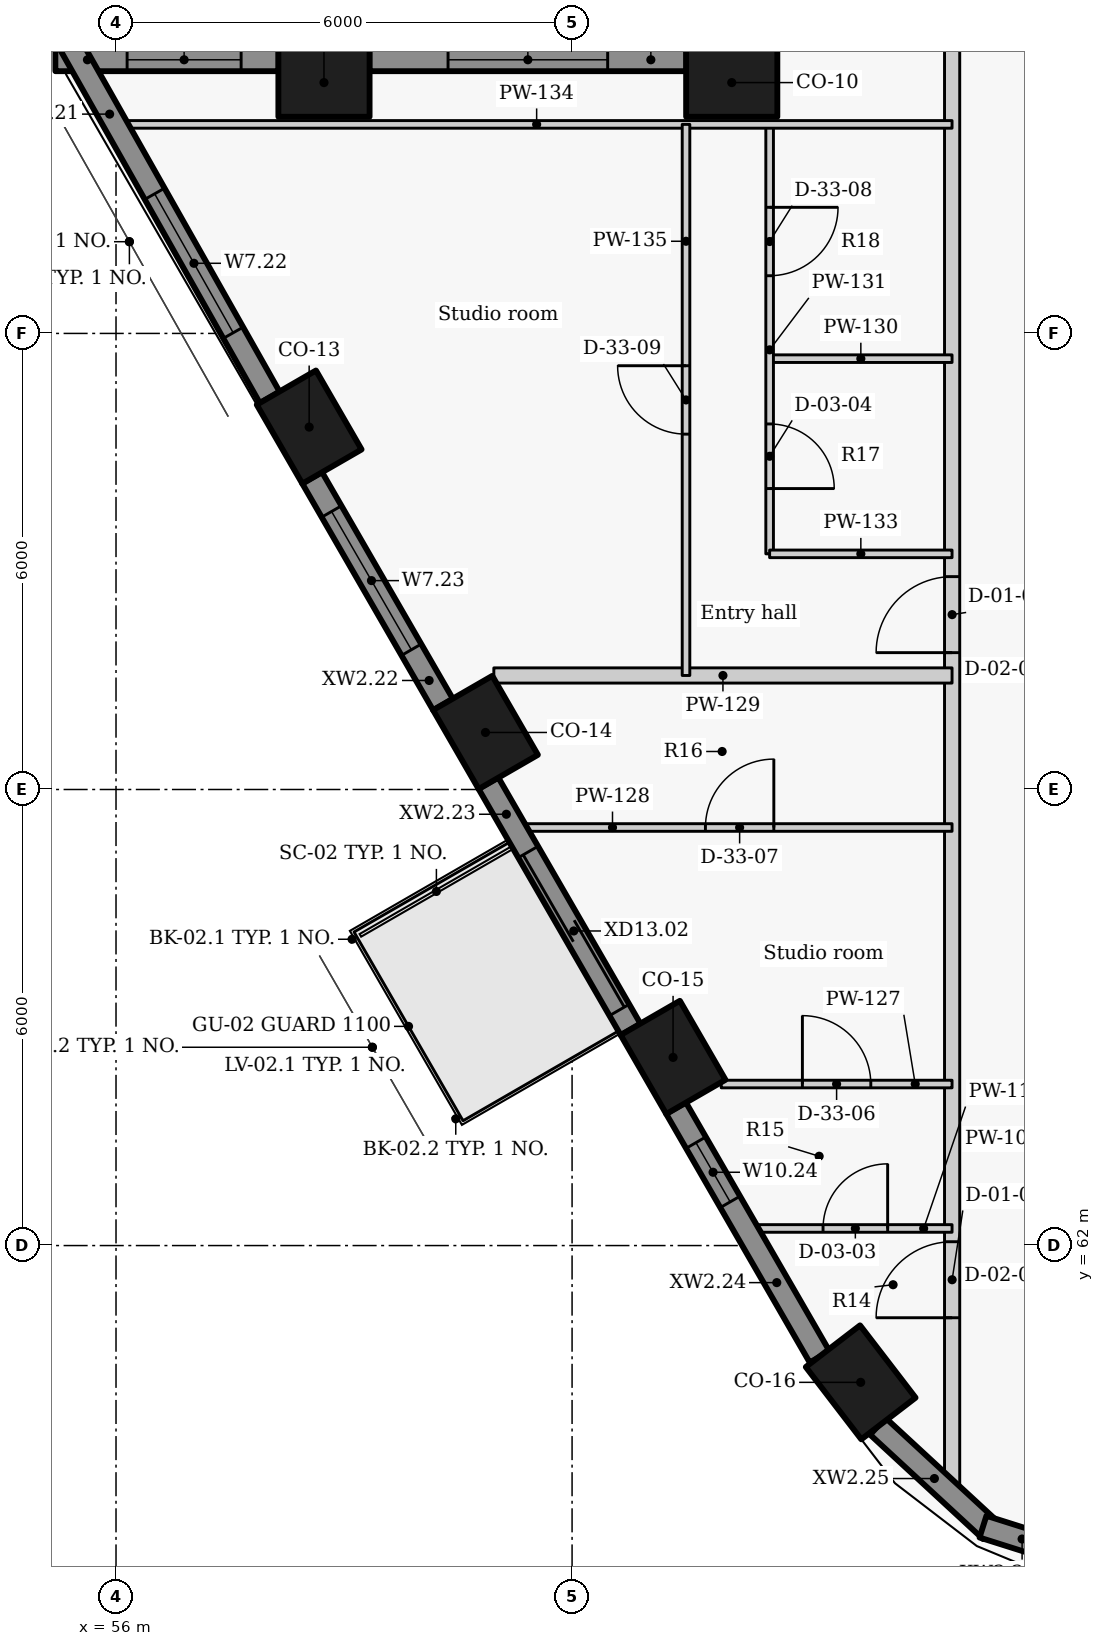
"""IFC4 building model, lengths in metres.
Left out: names, types, materials, properties, quantities, classifications, styles, units other than length and angle.
Written with IfcOpenShell. Run it as: python <this file> out.ifc"""

import sys

from ifc_helpers import new_model, si_unit, direction, frame, frame_2d, origin, origin_2d, place, context, subcontext, project, spatial, rectangle, extrude, element, fill, save


model = new_model("IFC4")
c1 = context("Model", 3, precision=1e-05, world=origin(), true_north=direction((0.0, 1.0)))
c2 = subcontext(c1, "Body", "Model", "MODEL_VIEW")
j1 = project(units=[si_unit("LENGTHUNIT", "METRE"), si_unit("PLANEANGLEUNIT", "RADIAN")], contexts=[c1])
p1 = place(None, origin())
s1 = spatial("IfcSite", under=j1, at=p1, CompositionType="ELEMENT")
p2 = place(p1, origin())
s2 = spatial("IfcBuilding", under=s1, at=p2, CompositionType="ELEMENT")
p3 = place(p2, frame((0.0, 0.0, 203.1)))
s3 = spatial("IfcBuildingStorey", under=s2, at=p3, CompositionType="ELEMENT", Elevation=203.1)
for number, where, z_axis, x_axis in (
    (1, (64.101, 77.3, 0.0), (0.0, 0.0, 1.0), (-1.0, 0.0, 0.0)),
    (2, (58.736, 77.3, 0.0), (0.0, 0.0, 1.0), (-1.0, 0.0, 0.0)),
    (3, (58.541, 72.768, 0.0), (0.0, 0.0, 1.0), (0.5, -0.866, 0.0)),
    (4, (60.861, 68.75, 0.0), (0.0, 0.0, 1.0), (0.5, -0.866, 0.0)),
    (5, (63.329, 64.475, 0.0), (0.0, 0.0, 1.0), (0.5, -0.866, 0.0)),
    (6, (65.797, 60.2, 0.0), (0.0, 0.0, 1.0), (0.609, -0.793, 0.0)),
):
    element("IfcColumn", number, at=place(p3, frame(where, z_axis=z_axis, x_axis=x_axis)), inside=s3, PredefinedType="COLUMN", context=c2, shape_type="SweptSolid", body=[
        extrude(rectangle(XDim=1.2, YDim=0.9, at=origin_2d()), origin(), (0.0, 0.0, 1.0), 3.3),
    ])
p4 = place(p3, frame((63.504, 77.6, 0.0), z_axis=(0.0, 0.0, 1.0), x_axis=(-1.0, 0.0, 0.0)))
e7 = element("IfcWall", 7, at=p4, inside=s3, PredefinedType="SOLIDWALL", context=c2, shape_type="SweptSolid", body=[
    extrude(rectangle(XDim=4.172, YDim=0.3, at=frame_2d((2.086, 0.0))), origin(), (0.0, 0.0, 1.0), 2.425),
])
p5 = place(p4, frame((1.036, 0.0, 0.9)))
e8 = element("IfcOpeningElement", 8, at=p5, cuts=e7, PredefinedType="OPENING", context=c2, shape_type="SweptSolid", body=[
    extrude(rectangle(XDim=2.1, YDim=1.1, at=frame_2d((1.05, 0.55))), frame((0.0, 0.16, 0.0), z_axis=(0.0, -1.0, 0.0), x_axis=(1.0, 0.0, 0.0)), (0.0, 0.0, 1.0), 0.32),
])
p6 = place(p3, frame((58.14, 77.6, 0.0), z_axis=(0.0, 0.0, 1.0), x_axis=(-1.0, 0.0, 0.0)))
e9 = element("IfcWall", 9, at=p6, inside=s3, PredefinedType="SOLIDWALL", context=c2, shape_type="SweptSolid", body=[
    extrude(rectangle(XDim=2.938, YDim=0.3, at=frame_2d((1.469, 0.0))), origin(), (0.0, 0.0, 1.0), 2.425),
])
p7 = place(p6, frame((0.494, 0.0, 0.9)))
e10 = element("IfcOpeningElement", 10, at=p7, cuts=e9, PredefinedType="OPENING", context=c2, shape_type="SweptSolid", body=[
    extrude(rectangle(XDim=1.5, YDim=1.1, at=frame_2d((0.75, 0.55))), frame((0.0, 0.16, 0.0), z_axis=(0.0, -1.0, 0.0), x_axis=(1.0, 0.0, 0.0)), (0.0, 0.0, 1.0), 0.32),
])
p8 = place(p3, frame((55.373, 77.846, 0.0), z_axis=(0.0, 0.0, 1.0), x_axis=(0.492033360928, -0.870576344575, 0.0)))
e11 = element("IfcWall", 11, at=p8, inside=s3, PredefinedType="SOLIDWALL", context=c2, shape_type="SweptSolid", body=[
    extrude(rectangle(XDim=5.387, YDim=0.3, at=frame_2d((2.693, 0.0))), origin(), (0.0, 0.0, 1.0), 2.425),
])
p9 = place(p8, frame((2.308, 0.0, 0.9)))
e12 = element("IfcOpeningElement", 12, at=p9, cuts=e11, PredefinedType="OPENING", context=c2, shape_type="SweptSolid", body=[
    extrude(rectangle(XDim=2.1, YDim=1.1, at=frame_2d((1.05, 0.55))), frame((0.0, 0.16, 0.0), z_axis=(0.0, -1.0, 0.0), x_axis=(1.0, 0.0, 0.0)), (0.0, 0.0, 1.0), 0.32),
])
p10 = place(p3, frame((58.579, 72.102, 0.0), z_axis=(0.0, 0.0, 1.0), x_axis=(0.499955427682, -0.866051136095, 0.0)))
e13 = element("IfcWall", 13, at=p10, inside=s3, PredefinedType="SOLIDWALL", context=c2, shape_type="SweptSolid", body=[
    extrude(rectangle(XDim=3.447, YDim=0.3, at=frame_2d((1.724, 0.0))), origin(), (0.0, 0.0, 1.0), 2.425),
])
p11 = place(p10, frame((0.513, 0.0, 0.9)))
e14 = element("IfcOpeningElement", 14, at=p11, cuts=e13, PredefinedType="OPENING", context=c2, shape_type="SweptSolid", body=[
    extrude(rectangle(XDim=2.1, YDim=1.1, at=frame_2d((1.05, 0.55))), frame((0.0, 0.16, 0.0), z_axis=(0.0, -1.0, 0.0), x_axis=(1.0, 0.0, 0.0)), (0.0, 0.0, 1.0), 0.32),
])
p12 = place(p3, frame((60.899, 68.084, 0.0), z_axis=(0.0, 0.0, 1.0), x_axis=(0.500059225181, -0.86599120741, 0.0)))
e15 = element("IfcWall", 15, at=p12, inside=s3, PredefinedType="SOLIDWALL", context=c2, shape_type="SweptSolid", body=[
    extrude(rectangle(XDim=3.744, YDim=0.3, at=frame_2d((1.872, 0.0))), origin(), (0.0, 0.0, 1.0), 2.425),
])
p13 = place(p12, frame((1.046, 0.0, 0.0)))
e16 = element("IfcOpeningElement", 16, at=p13, cuts=e15, PredefinedType="OPENING", context=c2, shape_type="SweptSolid", body=[
    extrude(rectangle(XDim=2.4, YDim=2.0, at=frame_2d((1.2, 1.0))), frame((0.0, 0.16, 0.0), z_axis=(0.0, -1.0, 0.0), x_axis=(1.0, 0.0, 0.0)), (0.0, 0.0, 1.0), 0.32),
])
p14 = place(p3, frame((63.367, 63.809, 0.0), z_axis=(0.0, 0.0, 1.0), x_axis=(0.499961087031, -0.866047869032, 0.0)))
e17 = element("IfcWall", 17, at=p14, inside=s3, PredefinedType="SOLIDWALL", context=c2, shape_type="SweptSolid", body=[
    extrude(rectangle(XDim=3.779, YDim=0.3, at=frame_2d((1.889, 0.0))), origin(), (0.0, 0.0, 1.0), 2.425),
])
p15 = place(p14, frame((0.526, 0.0, 1.5)))
e18 = element("IfcOpeningElement", 18, at=p15, cuts=e17, PredefinedType="OPENING", context=c2, shape_type="SweptSolid", body=[
    extrude(rectangle(XDim=0.9, YDim=0.5, at=frame_2d((0.45, 0.25))), frame((0.0, 0.16, 0.0), z_axis=(0.0, -1.0, 0.0), x_axis=(1.0, 0.0, 0.0)), (0.0, 0.0, 1.0), 0.32),
])
p16 = place(p3, frame((66.022, 59.622, 0.0), z_axis=(0.0, 0.0, 1.0), x_axis=(0.734627852992, -0.678470277616, 0.0)))
e19 = element("IfcWall", 19, at=p16, inside=s3, PredefinedType="SOLIDWALL", context=c2, shape_type="SweptSolid", body=[
    extrude(rectangle(XDim=2.026, YDim=0.3, at=frame_2d((1.013, 0.0))), origin(), (0.0, 0.0, 1.0), 2.425),
])
p17 = place(p3, frame((67.406, 58.302, 0.0), z_axis=(0.0, 0.0, 1.0), x_axis=(0.953537608367, -0.301274010545, 0.0)))
e20 = element("IfcWall", 20, at=p17, inside=s3, PredefinedType="SOLIDWALL", context=c2, shape_type="SweptSolid", body=[
    extrude(rectangle(XDim=2.048, YDim=0.3, at=frame_2d((1.024, 0.0))), origin(), (0.0, 0.0, 1.0), 2.425),
])
p18 = place(p17, frame((1.18, 0.0, 0.9)))
e21 = element("IfcOpeningElement", 21, at=p18, cuts=e20, PredefinedType="OPENING", context=c2, shape_type="SweptSolid", body=[
    extrude(rectangle(XDim=0.6, YDim=1.1, at=frame_2d((0.3, 0.55))), frame((0.0, 0.16, 0.0), z_axis=(0.0, -1.0, 0.0), x_axis=(1.0, 0.0, 0.0)), (0.0, 0.0, 1.0), 0.32),
])
p19 = place(p3, frame((67.0, 58.674, 0.0), z_axis=(0.0, 0.0, 1.0), x_axis=(0.0, 1.0, 0.0)))
e22 = element("IfcWall", 22, at=p19, inside=s3, PredefinedType="PARTITIONING", context=c2, shape_type="SweptSolid", body=[
    extrude(rectangle(XDim=42.592, YDim=0.2, at=frame_2d((21.296, 0.0))), origin(), (0.0, 0.0, 1.0), 2.405),
])
p20 = place(p19, frame((2.376, 0.0, 0.0)))
e23 = element("IfcOpeningElement", 23, at=p20, cuts=e22, PredefinedType="OPENING", context=c2, shape_type="SweptSolid", body=[
    extrude(rectangle(XDim=1.0, YDim=2.1, at=frame_2d((0.5, 1.05))), frame((0.0, 0.11, 0.0), z_axis=(0.0, -1.0, 0.0), x_axis=(1.0, 0.0, 0.0)), (0.0, 0.0, 1.0), 0.22),
])
p21 = place(p19, frame((11.126, 0.0, 0.0)))
e24 = element("IfcOpeningElement", 24, at=p21, cuts=e22, PredefinedType="OPENING", context=c2, shape_type="SweptSolid", body=[
    extrude(rectangle(XDim=1.0, YDim=2.1, at=frame_2d((0.5, 1.05))), frame((0.0, 0.11, 0.0), z_axis=(0.0, -1.0, 0.0), x_axis=(1.0, 0.0, 0.0)), (0.0, 0.0, 1.0), 0.22),
])
p22 = place(p19, frame((25.626, 0.0, 0.0)))
e25 = element("IfcOpeningElement", 25, at=p22, cuts=e22, PredefinedType="OPENING", context=c2, shape_type="SweptSolid", body=[
    extrude(rectangle(XDim=1.0, YDim=2.1, at=frame_2d((0.5, 1.05))), frame((0.0, 0.11, 0.0), z_axis=(0.0, -1.0, 0.0), x_axis=(1.0, 0.0, 0.0)), (0.0, 0.0, 1.0), 0.22),
])
p23 = place(p19, frame((21.2, 0.0, 0.0)))
e26 = element("IfcOpeningElement", 26, at=p23, cuts=e22, PredefinedType="OPENING", context=c2, shape_type="SweptSolid", body=[
    extrude(rectangle(XDim=1.0, YDim=2.1, at=frame_2d((0.5, 1.05))), frame((0.0, 0.11, 0.0), z_axis=(0.0, -1.0, 0.0), x_axis=(1.0, 0.0, 0.0)), (0.0, 0.0, 1.0), 0.22),
])
p24 = place(p19, frame((37.788, 0.0, 0.0)))
e27 = element("IfcOpeningElement", 27, at=p24, cuts=e22, PredefinedType="OPENING", context=c2, shape_type="SweptSolid", body=[
    extrude(rectangle(XDim=1.0, YDim=2.1, at=frame_2d((0.5, 1.05))), frame((0.0, 0.11, 0.0), z_axis=(0.0, -1.0, 0.0), x_axis=(1.0, 0.0, 0.0)), (0.0, 0.0, 1.0), 0.22),
])
p25 = place(p3, frame((64.455, 62.225, 0.0), z_axis=(0.0, 0.0, 1.0), x_axis=(1.0, 0.0, 0.0)))
e28 = element("IfcWall", 28, at=p25, inside=s3, PredefinedType="PARTITIONING", context=c2, shape_type="SweptSolid", body=[
    extrude(rectangle(XDim=2.544, YDim=0.1, at=frame_2d((1.272, 0.0))), origin(), (0.0, 0.0, 1.0), 2.405),
])
p26 = place(p25, frame((0.847, 0.0, 0.0)))
e29 = element("IfcOpeningElement", 29, at=p26, cuts=e28, PredefinedType="OPENING", context=c2, shape_type="SweptSolid", body=[
    extrude(rectangle(XDim=0.85, YDim=2.1, at=frame_2d((0.425, 1.05))), frame((0.0, 0.06, 0.0), z_axis=(0.0, -1.0, 0.0), x_axis=(1.0, 0.0, 0.0)), (0.0, 0.0, 1.0), 0.12),
])
p27 = place(p3, frame((63.962, 64.125, 0.0), z_axis=(0.0, 0.0, 1.0), x_axis=(1.0, 0.0, 0.0)))
e30 = element("IfcWall", 30, at=p27, inside=s3, PredefinedType="PARTITIONING", context=c2, shape_type="SweptSolid", body=[
    extrude(rectangle(XDim=3.037, YDim=0.1, at=frame_2d((1.519, 0.0))), origin(), (0.0, 0.0, 1.0), 3.025),
])
p28 = place(p27, frame((1.068, 0.0, 0.0)))
e31 = element("IfcOpeningElement", 31, at=p28, cuts=e30, PredefinedType="OPENING", context=c2, shape_type="SweptSolid", body=[
    extrude(rectangle(XDim=0.9, YDim=2.1, at=frame_2d((0.45, 1.05))), frame((0.0, 0.06, 0.0), z_axis=(0.0, -1.0, 0.0), x_axis=(1.0, 0.0, 0.0)), (0.0, 0.0, 1.0), 0.12),
])
p29 = place(p3, frame((61.409, 67.5, 0.0), z_axis=(0.0, 0.0, 1.0), x_axis=(1.0, 0.0, 0.0)))
e32 = element("IfcWall", 32, at=p29, inside=s3, PredefinedType="PARTITIONING", context=c2, shape_type="SweptSolid", body=[
    extrude(rectangle(XDim=5.59, YDim=0.1, at=frame_2d((2.795, 0.0))), origin(), (0.0, 0.0, 1.0), 2.405),
])
p30 = place(p29, frame((2.345, 0.0, 0.0)))
e33 = element("IfcOpeningElement", 33, at=p30, cuts=e32, PredefinedType="OPENING", context=c2, shape_type="SweptSolid", body=[
    extrude(rectangle(XDim=0.9, YDim=2.1, at=frame_2d((0.45, 1.05))), frame((0.0, 0.06, 0.0), z_axis=(0.0, -1.0, 0.0), x_axis=(1.0, 0.0, 0.0)), (0.0, 0.0, 1.0), 0.12),
])
p31 = place(p3, frame((60.971, 69.5, 0.0), z_axis=(0.0, 0.0, 1.0), x_axis=(1.0, 0.0, 0.0)))
e34 = element("IfcWall", 34, at=p31, inside=s3, PredefinedType="PARTITIONING", context=c2, shape_type="SweptSolid", body=[
    extrude(rectangle(XDim=6.028, YDim=0.2, at=frame_2d((3.014, 0.0))), origin(), (0.0, 0.0, 1.0), 3.025),
])
p32 = place(p3, frame((64.599, 73.668, 0.0), z_axis=(0.0, 0.0, 1.0), x_axis=(1.0, 0.0, 0.0)))
e35 = element("IfcWall", 35, at=p32, inside=s3, PredefinedType="PARTITIONING", context=c2, shape_type="SweptSolid", body=[
    extrude(rectangle(XDim=2.4, YDim=0.1, at=frame_2d((1.2, 0.0))), origin(), (0.0, 0.0, 1.0), 3.025),
])
p33 = place(p3, frame((64.599, 76.75, 0.0), z_axis=(0.0, 0.0, 1.0), x_axis=(0.0, -1.0, 0.0)))
e36 = element("IfcWall", 36, at=p33, inside=s3, PredefinedType="PARTITIONING", context=c2, shape_type="SweptSolid", body=[
    extrude(rectangle(XDim=5.65, YDim=0.1, at=frame_2d((2.825, 0.0))), origin(), (0.0, 0.0, 1.0), 3.025),
])
p34 = place(p33, frame((3.941, 0.0, 0.0)))
e37 = element("IfcOpeningElement", 37, at=p34, cuts=e36, PredefinedType="OPENING", context=c2, shape_type="SweptSolid", body=[
    extrude(rectangle(XDim=0.85, YDim=2.1, at=frame_2d((0.425, 1.05))), frame((0.0, 0.06, 0.0), z_axis=(0.0, -1.0, 0.0), x_axis=(1.0, 0.0, 0.0)), (0.0, 0.0, 1.0), 0.12),
])
p35 = place(p33, frame((1.091, 0.0, 0.0)))
e38 = element("IfcOpeningElement", 38, at=p35, cuts=e36, PredefinedType="OPENING", context=c2, shape_type="SweptSolid", body=[
    extrude(rectangle(XDim=0.9, YDim=2.1, at=frame_2d((0.45, 1.05))), frame((0.0, 0.06, 0.0), z_axis=(0.0, -1.0, 0.0), x_axis=(1.0, 0.0, 0.0)), (0.0, 0.0, 1.0), 0.12),
])
p36 = place(p3, frame((64.599, 71.1, 0.0), z_axis=(0.0, 0.0, 1.0), x_axis=(1.0, 0.0, 0.0)))
e39 = element("IfcWall", 39, at=p36, inside=s3, PredefinedType="PARTITIONING", context=c2, shape_type="SweptSolid", body=[
    extrude(rectangle(XDim=2.4, YDim=0.1, at=frame_2d((1.2, 0.0))), origin(), (0.0, 0.0, 1.0), 3.025),
])
p37 = place(p3, frame((56.069, 76.75, 0.0), z_axis=(0.0, 0.0, 1.0), x_axis=(1.0, 0.0, 0.0)))
e40 = element("IfcWall", 40, at=p37, inside=s3, PredefinedType="PARTITIONING", context=c2, shape_type="SweptSolid", body=[
    extrude(rectangle(XDim=10.93, YDim=0.1, at=frame_2d((5.465, 0.0))), origin(), (0.0, 0.0, 1.0), 2.405),
])
p38 = place(p3, frame((63.499, 69.5, 0.0), z_axis=(0.0, 0.0, 1.0), x_axis=(0.0, 1.0, 0.0)))
e41 = element("IfcWall", 41, at=p38, inside=s3, PredefinedType="PARTITIONING", context=c2, shape_type="SweptSolid", body=[
    extrude(rectangle(XDim=7.25, YDim=0.1, at=frame_2d((3.625, 0.0))), origin(), (0.0, 0.0, 1.0), 3.025),
])
p39 = place(p38, frame((3.175, 0.0, 0.0)))
e42 = element("IfcOpeningElement", 42, at=p39, cuts=e41, PredefinedType="OPENING", context=c2, shape_type="SweptSolid", body=[
    extrude(rectangle(XDim=0.9, YDim=2.1, at=frame_2d((0.45, 1.05))), frame((0.0, 0.06, 0.0), z_axis=(0.0, -1.0, 0.0), x_axis=(1.0, 0.0, 0.0)), (0.0, 0.0, 1.0), 0.12),
])
p40 = place(p5, origin())
e43 = element("IfcWindow", 43, at=p40, inside=s3, PartitioningType="SINGLE_PANEL", PredefinedType="WINDOW", context=c2, shape_type="SweptSolid", body=[
    extrude(rectangle(XDim=2.1, YDim=1.1, at=frame_2d((1.05, 0.55))), frame((0.0, 0.03, 0.0), z_axis=(0.0, -1.0, 0.0), x_axis=(1.0, 0.0, 0.0)), (0.0, 0.0, 1.0), 0.06),
])
fill(e8, e43)
p41 = place(p7, origin())
e44 = element("IfcWindow", 44, at=p41, inside=s3, PartitioningType="SINGLE_PANEL", PredefinedType="WINDOW", context=c2, shape_type="SweptSolid", body=[
    extrude(rectangle(XDim=1.5, YDim=1.1, at=frame_2d((0.75, 0.55))), frame((0.0, 0.03, 0.0), z_axis=(0.0, -1.0, 0.0), x_axis=(1.0, 0.0, 0.0)), (0.0, 0.0, 1.0), 0.06),
])
fill(e10, e44)
p42 = place(p9, origin())
e45 = element("IfcWindow", 45, at=p42, inside=s3, PartitioningType="SINGLE_PANEL", PredefinedType="WINDOW", context=c2, shape_type="SweptSolid", body=[
    extrude(rectangle(XDim=2.1, YDim=1.1, at=frame_2d((1.05, 0.55))), frame((0.0, 0.03, 0.0), z_axis=(0.0, -1.0, 0.0), x_axis=(1.0, 0.0, 0.0)), (0.0, 0.0, 1.0), 0.06),
])
fill(e12, e45)
p43 = place(p11, origin())
e46 = element("IfcWindow", 46, at=p43, inside=s3, PartitioningType="SINGLE_PANEL", PredefinedType="WINDOW", context=c2, shape_type="SweptSolid", body=[
    extrude(rectangle(XDim=2.1, YDim=1.1, at=frame_2d((1.05, 0.55))), frame((0.0, 0.03, 0.0), z_axis=(0.0, -1.0, 0.0), x_axis=(1.0, 0.0, 0.0)), (0.0, 0.0, 1.0), 0.06),
])
fill(e14, e46)
p44 = place(p13, origin())
e47 = element("IfcDoor", 47, at=p44, inside=s3, OperationType="DOUBLE_DOOR_SLIDING", PredefinedType="DOOR", context=c2, shape_type="SweptSolid", body=[
    extrude(rectangle(XDim=2.4, YDim=2.0, at=frame_2d((1.2, 1.0))), frame((0.0, 0.025, 0.0), z_axis=(0.0, -1.0, 0.0), x_axis=(1.0, 0.0, 0.0)), (0.0, 0.0, 1.0), 0.05),
])
fill(e16, e47)
p45 = place(p15, origin())
e48 = element("IfcWindow", 48, at=p45, inside=s3, PartitioningType="SINGLE_PANEL", PredefinedType="WINDOW", context=c2, shape_type="SweptSolid", body=[
    extrude(rectangle(XDim=0.9, YDim=0.5, at=frame_2d((0.45, 0.25))), frame((0.0, 0.03, 0.0), z_axis=(0.0, -1.0, 0.0), x_axis=(1.0, 0.0, 0.0)), (0.0, 0.0, 1.0), 0.06),
])
fill(e18, e48)
p46 = place(p20, origin())
e49 = element("IfcDoor", 49, at=p46, inside=s3, OperationType="SINGLE_SWING_LEFT", PredefinedType="DOOR", context=c2, shape_type="SweptSolid", body=[
    extrude(rectangle(XDim=1.0, YDim=2.1, at=frame_2d((0.5, 1.05))), frame((0.0, 0.025, 0.0), z_axis=(0.0, -1.0, 0.0), x_axis=(1.0, 0.0, 0.0)), (0.0, 0.0, 1.0), 0.05),
])
fill(e23, e49)
p47 = place(p26, origin())
e50 = element("IfcDoor", 50, at=p47, inside=s3, OperationType="SINGLE_SWING_RIGHT", PredefinedType="DOOR", context=c2, shape_type="SweptSolid", body=[
    extrude(rectangle(XDim=0.85, YDim=2.1, at=frame_2d((0.425, 1.05))), frame((0.0, 0.025, 0.0), z_axis=(0.0, -1.0, 0.0), x_axis=(1.0, 0.0, 0.0)), (0.0, 0.0, 1.0), 0.05),
])
fill(e29, e50)
p48 = place(p28, origin())
e51 = element("IfcDoor", 51, at=p48, inside=s3, OperationType="SINGLE_SWING_LEFT", PredefinedType="DOOR", context=c2, shape_type="SweptSolid", body=[
    extrude(rectangle(XDim=0.9, YDim=2.1, at=frame_2d((0.45, 1.05))), frame((0.0, 0.025, 0.0), z_axis=(0.0, -1.0, 0.0), x_axis=(1.0, 0.0, 0.0)), (0.0, 0.0, 1.0), 0.05),
])
fill(e31, e51)
p49 = place(p30, origin())
e52 = element("IfcDoor", 52, at=p49, inside=s3, OperationType="SINGLE_SWING_RIGHT", PredefinedType="DOOR", context=c2, shape_type="SweptSolid", body=[
    extrude(rectangle(XDim=0.9, YDim=2.1, at=frame_2d((0.45, 1.05))), frame((0.0, 0.025, 0.0), z_axis=(0.0, -1.0, 0.0), x_axis=(1.0, 0.0, 0.0)), (0.0, 0.0, 1.0), 0.05),
])
fill(e33, e52)
p50 = place(p21, origin())
e53 = element("IfcDoor", 53, at=p50, inside=s3, OperationType="SINGLE_SWING_LEFT", PredefinedType="DOOR", context=c2, shape_type="SweptSolid", body=[
    extrude(rectangle(XDim=1.0, YDim=2.1, at=frame_2d((0.5, 1.05))), frame((0.0, 0.025, 0.0), z_axis=(0.0, -1.0, 0.0), x_axis=(1.0, 0.0, 0.0)), (0.0, 0.0, 1.0), 0.05),
])
fill(e24, e53)
p51 = place(p34, origin())
e54 = element("IfcDoor", 54, at=p51, inside=s3, OperationType="SINGLE_SWING_RIGHT", PredefinedType="DOOR", context=c2, shape_type="SweptSolid", body=[
    extrude(rectangle(XDim=0.85, YDim=2.1, at=frame_2d((0.425, 1.05))), frame((0.0, 0.025, 0.0), z_axis=(0.0, -1.0, 0.0), x_axis=(1.0, 0.0, 0.0)), (0.0, 0.0, 1.0), 0.05),
])
fill(e37, e54)
p52 = place(p35, origin())
e55 = element("IfcDoor", 55, at=p52, inside=s3, OperationType="SINGLE_SWING_LEFT", PredefinedType="DOOR", context=c2, shape_type="SweptSolid", body=[
    extrude(rectangle(XDim=0.9, YDim=2.1, at=frame_2d((0.45, 1.05))), frame((0.0, 0.025, 0.0), z_axis=(0.0, -1.0, 0.0), x_axis=(1.0, 0.0, 0.0)), (0.0, 0.0, 1.0), 0.05),
])
fill(e38, e55)
p53 = place(p39, origin())
e56 = element("IfcDoor", 56, at=p53, inside=s3, OperationType="SINGLE_SWING_RIGHT", PredefinedType="DOOR", context=c2, shape_type="SweptSolid", body=[
    extrude(rectangle(XDim=0.9, YDim=2.1, at=frame_2d((0.45, 1.05))), frame((0.0, 0.025, 0.0), z_axis=(0.0, -1.0, 0.0), x_axis=(1.0, 0.0, 0.0)), (0.0, 0.0, 1.0), 0.05),
])
fill(e42, e56)
save(model, sys.argv[1])
